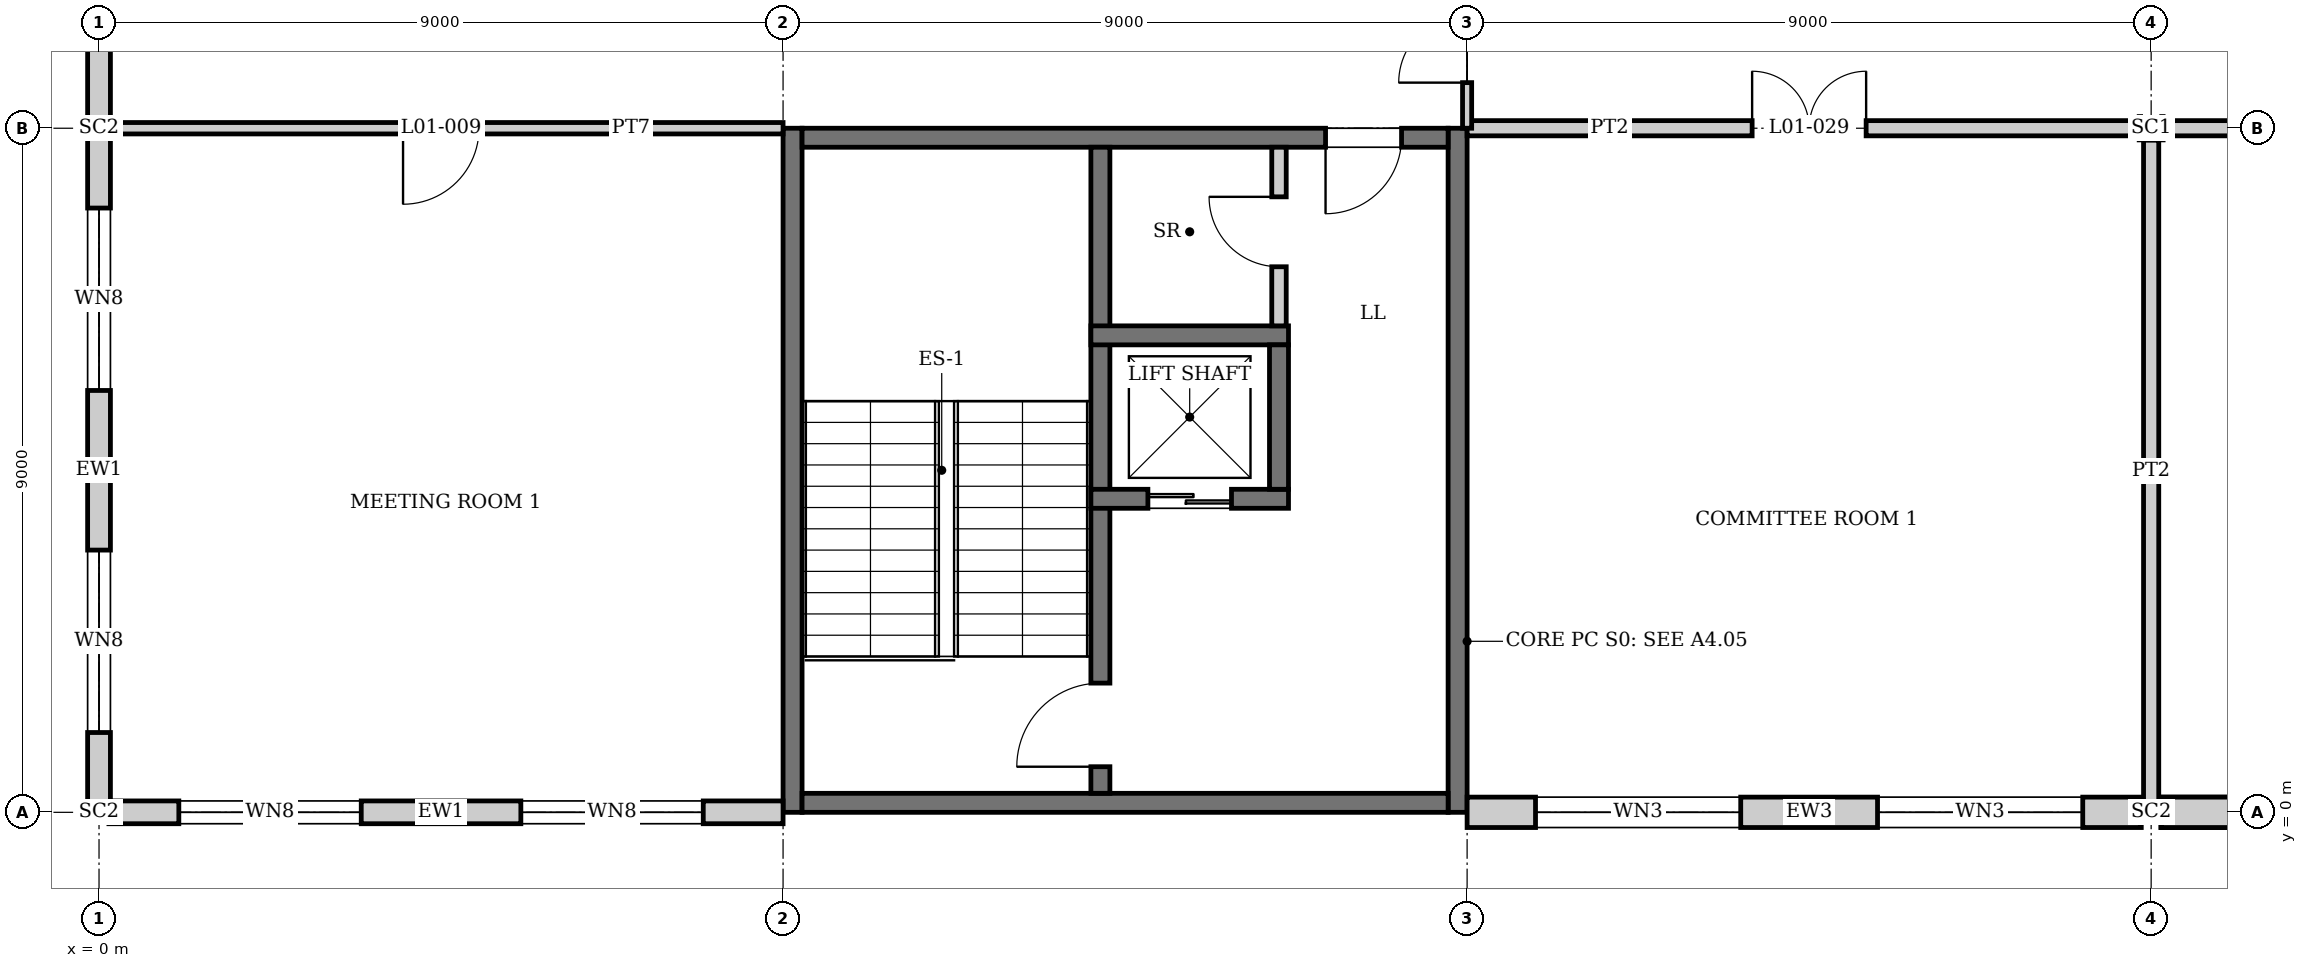
"""IFC4 building model, lengths in metres.
Left out: names, types, materials, properties, quantities, classifications, styles, units other than length and angle.
Written with IfcOpenShell. Run it as: python <this file> out.ifc"""

import sys

from ifc_helpers import new_model, si_unit, direction, frame, frame_2d, origin, origin_2d, place, context, subcontext, project, spatial, polyline, rectangle, i_section, outline, extrude, element, fill, save


model = new_model("IFC4")
c1 = context("Model", 3, precision=1e-05, world=origin(), true_north=direction((0.0, 1.0)))
c2 = subcontext(c1, "Body", "Model", "MODEL_VIEW")
j1 = project(units=[si_unit("LENGTHUNIT", "METRE"), si_unit("PLANEANGLEUNIT", "RADIAN")], contexts=[c1])
p1 = place(None, origin())
s1 = spatial("IfcSite", under=j1, at=p1, CompositionType="ELEMENT")
p2 = place(p1, origin())
s2 = spatial("IfcBuilding", under=s1, at=p2, CompositionType="ELEMENT")
p3 = place(p2, frame((0.0, 0.0, 6.0)))
s3 = spatial("IfcBuildingStorey", under=s2, at=p3, CompositionType="ELEMENT", Elevation=6.0)
for number, where, z_axis, x_axis in (
    (1, (0.0, 0.0, 0.0), (0.0, 0.0, 1.0), (0.0, 1.0, 0.0)),
    (2, (0.0, 9.0, 0.0), (0.0, 0.0, 1.0), (0.0, 1.0, 0.0)),
    (3, (27.0, 0.0, 0.0), (0.0, 0.0, 1.0), (0.0, 1.0, 0.0)),
):
    element("IfcColumn", number, at=place(p3, frame(where, z_axis=z_axis, x_axis=x_axis)), inside=s3, PredefinedType="COLUMN", context=c2, shape_type="SweptSolid", body=[
        extrude(i_section(OverallWidth=0.256, OverallDepth=0.26, WebThickness=0.01, FlangeThickness=0.017, at=origin_2d()), origin(), (0.0, 0.0, 1.0), 4.5),
    ])
p4 = place(p3, frame((27.0, 9.0, 0.0), z_axis=(0.0, 0.0, 1.0), x_axis=(0.0, 1.0, 0.0)))
e4 = element("IfcColumn", 4, at=p4, inside=s3, PredefinedType="COLUMN", context=c2, shape_type="SweptSolid", body=[
    extrude(i_section(OverallWidth=0.307, OverallDepth=0.315, WebThickness=0.012, FlangeThickness=0.019, at=origin_2d()), origin(), (0.0, 0.0, 1.0), 4.5),
])
for number, where, z_axis, x_axis in (
    (5, (9.125, 0.0, 0.0), (0.0, 0.0, 1.0), (0.0, 1.0, 0.0)),
    (6, (17.875, 0.0, 0.0), (0.0, 0.0, 1.0), (0.0, 1.0, 0.0)),
):
    element("IfcWall", number, at=place(p3, frame(where, z_axis=z_axis, x_axis=x_axis)), inside=s3, PredefinedType="SHEAR", context=c2, shape_type="SweptSolid", body=[
        extrude(rectangle(XDim=9.0, YDim=0.25, at=frame_2d((4.5, 0.0))), origin(), (0.0, 0.0, 1.0), 4.5),
    ])
p5 = place(p3, frame((9.25, 0.125, 0.0), z_axis=(0.0, 0.0, 1.0), x_axis=(1.0, 0.0, 0.0)))
e7 = element("IfcWall", 7, at=p5, inside=s3, PredefinedType="SHEAR", context=c2, shape_type="SweptSolid", body=[
    extrude(rectangle(XDim=8.5, YDim=0.25, at=frame_2d((4.25, 0.0))), origin(), (0.0, 0.0, 1.0), 4.5),
])
p6 = place(p3, frame((9.25, 8.875, 0.0), z_axis=(0.0, 0.0, 1.0), x_axis=(1.0, 0.0, 0.0)))
e8 = element("IfcWall", 8, at=p6, inside=s3, PredefinedType="SHEAR", context=c2, shape_type="SweptSolid", body=[
    extrude(rectangle(XDim=8.5, YDim=0.25, at=frame_2d((4.25, 0.0))), origin(), (0.0, 0.0, 1.0), 4.5),
])
p7 = place(p6, frame((6.887, 0.0, 0.0)))
e9 = element("IfcOpeningElement", 9, at=p7, cuts=e8, PredefinedType="OPENING", context=c2, shape_type="SweptSolid", body=[
    extrude(rectangle(XDim=1.0, YDim=2.1, at=frame_2d((0.5, 1.05))), frame((0.0, 0.135, 0.0), z_axis=(0.0, -1.0, 0.0), x_axis=(1.0, 0.0, 0.0)), (0.0, 0.0, 1.0), 0.27),
])
p8 = place(p3, frame((0.13, 0.0, 0.0), z_axis=(0.0, 0.0, 1.0), x_axis=(1.0, 0.0, 0.0)))
e10 = element("IfcWall", 10, at=p8, inside=s3, PredefinedType="SOLIDWALL", context=c2, shape_type="SweptSolid", body=[
    extrude(rectangle(XDim=8.87, YDim=0.3, at=frame_2d((4.435, 0.0))), origin(), (0.0, 0.0, 1.0), 3.991),
])
p9 = place(p8, frame((0.92, 0.0, 0.9)))
e11 = element("IfcOpeningElement", 11, at=p9, cuts=e10, PredefinedType="OPENING", context=c2, shape_type="SweptSolid", body=[
    extrude(rectangle(XDim=2.4, YDim=2.1, at=frame_2d((1.2, 1.05))), frame((0.0, 0.16, 0.0), z_axis=(0.0, -1.0, 0.0), x_axis=(1.0, 0.0, 0.0)), (0.0, 0.0, 1.0), 0.32),
])
p10 = place(p8, frame((5.42, 0.0, 0.9)))
e12 = element("IfcOpeningElement", 12, at=p10, cuts=e10, PredefinedType="OPENING", context=c2, shape_type="SweptSolid", body=[
    extrude(rectangle(XDim=2.4, YDim=2.1, at=frame_2d((1.2, 1.05))), frame((0.0, 0.16, 0.0), z_axis=(0.0, -1.0, 0.0), x_axis=(1.0, 0.0, 0.0)), (0.0, 0.0, 1.0), 0.32),
])
p11 = place(p3, frame((18.0, 0.0, 0.0), z_axis=(0.0, 0.0, 1.0), x_axis=(1.0, 0.0, 0.0)))
e13 = element("IfcWall", 13, at=p11, inside=s3, PredefinedType="SOLIDWALL", context=c2, shape_type="SweptSolid", body=[
    extrude(rectangle(XDim=8.87, YDim=0.4, at=frame_2d((4.435, 0.0))), origin(), (0.0, 0.0, 1.0), 3.991),
])
p12 = place(p11, frame((0.9, 0.0, 1.5)))
e14 = element("IfcOpeningElement", 14, at=p12, cuts=e13, PredefinedType="OPENING", context=c2, shape_type="SweptSolid", body=[
    extrude(rectangle(XDim=2.7, YDim=1.5, at=frame_2d((1.35, 0.75))), frame((0.0, 0.21, 0.0), z_axis=(0.0, -1.0, 0.0), x_axis=(1.0, 0.0, 0.0)), (0.0, 0.0, 1.0), 0.42),
])
p13 = place(p11, frame((5.4, 0.0, 1.5)))
e15 = element("IfcOpeningElement", 15, at=p13, cuts=e13, PredefinedType="OPENING", context=c2, shape_type="SweptSolid", body=[
    extrude(rectangle(XDim=2.7, YDim=1.5, at=frame_2d((1.35, 0.75))), frame((0.0, 0.21, 0.0), z_axis=(0.0, -1.0, 0.0), x_axis=(1.0, 0.0, 0.0)), (0.0, 0.0, 1.0), 0.42),
])
p14 = place(p3, frame((27.13, 0.0, 0.0), z_axis=(0.0, 0.0, 1.0), x_axis=(1.0, 0.0, 0.0)))
e16 = element("IfcWall", 16, at=p14, inside=s3, PredefinedType="SOLIDWALL", context=c2, shape_type="SweptSolid", body=[
    extrude(outline(polyline([(8.74, 0.0), (0.0, 0.0), (0.0, 3.86), (8.692, 0.38), (8.74, 0.5), (8.74, 0.0)])), frame((0.0, 0.2, 0.0), z_axis=(0.0, -1.0, 0.0), x_axis=(1.0, 0.0, 0.0)), (0.0, 0.0, 1.0), 0.4),
])
p15 = place(p3, frame((27.13, 0.0, 0.0), z_axis=(0.0, 0.0, 1.0), x_axis=(1.0, 0.0, 0.0)))
e17 = element("IfcWall", 17, at=p15, inside=s3, PredefinedType="SOLIDWALL", context=c2, shape_type="SweptSolid", body=[
    extrude(outline(polyline([(8.74, 3.991), (8.74, 0.64), (0.371, 3.991), (8.74, 3.991)])), frame((0.0, 0.2, 0.0), z_axis=(0.0, -1.0, 0.0), x_axis=(1.0, 0.0, 0.0)), (0.0, 0.0, 1.0), 0.4),
])
p16 = place(p3, frame((0.0, 0.128, 0.0), z_axis=(0.0, 0.0, 1.0), x_axis=(0.0, 1.0, 0.0)))
e18 = element("IfcWall", 18, at=p16, inside=s3, PredefinedType="SOLIDWALL", context=c2, shape_type="SweptSolid", body=[
    extrude(rectangle(XDim=8.744, YDim=0.3, at=frame_2d((4.372, 0.0))), origin(), (0.0, 0.0, 1.0), 3.947),
])
p17 = place(p16, frame((0.922, 0.0, 0.9)))
e19 = element("IfcOpeningElement", 19, at=p17, cuts=e18, PredefinedType="OPENING", context=c2, shape_type="SweptSolid", body=[
    extrude(rectangle(XDim=2.4, YDim=2.1, at=frame_2d((1.2, 1.05))), frame((0.0, 0.16, 0.0), z_axis=(0.0, -1.0, 0.0), x_axis=(1.0, 0.0, 0.0)), (0.0, 0.0, 1.0), 0.32),
])
p18 = place(p16, frame((5.422, 0.0, 0.9)))
e20 = element("IfcOpeningElement", 20, at=p18, cuts=e18, PredefinedType="OPENING", context=c2, shape_type="SweptSolid", body=[
    extrude(rectangle(XDim=2.4, YDim=2.1, at=frame_2d((1.2, 1.05))), frame((0.0, 0.16, 0.0), z_axis=(0.0, -1.0, 0.0), x_axis=(1.0, 0.0, 0.0)), (0.0, 0.0, 1.0), 0.32),
])
p19 = place(p3, frame((0.0, 9.128, 0.0), z_axis=(0.0, 0.0, 1.0), x_axis=(0.0, 1.0, 0.0)))
e21 = element("IfcWall", 21, at=p19, inside=s3, PredefinedType="SOLIDWALL", context=c2, shape_type="SweptSolid", body=[
    extrude(rectangle(XDim=8.872, YDim=0.3, at=frame_2d((4.436, 0.0))), origin(), (0.0, 0.0, 1.0), 3.947),
])
p20 = place(p19, frame((1.222, 0.0, 0.9)))
e22 = element("IfcOpeningElement", 22, at=p20, cuts=e21, PredefinedType="OPENING", context=c2, shape_type="SweptSolid", body=[
    extrude(rectangle(XDim=1.8, YDim=2.4, at=frame_2d((0.9, 1.2))), frame((0.0, 0.16, 0.0), z_axis=(0.0, -1.0, 0.0), x_axis=(1.0, 0.0, 0.0)), (0.0, 0.0, 1.0), 0.32),
])
p21 = place(p19, frame((5.722, 0.0, 0.9)))
e23 = element("IfcOpeningElement", 23, at=p21, cuts=e21, PredefinedType="OPENING", context=c2, shape_type="SweptSolid", body=[
    extrude(rectangle(XDim=1.8, YDim=2.4, at=frame_2d((0.9, 1.2))), frame((0.0, 0.16, 0.0), z_axis=(0.0, -1.0, 0.0), x_axis=(1.0, 0.0, 0.0)), (0.0, 0.0, 1.0), 0.32),
])
p22 = place(p3, frame((13.175, 0.25, 0.0), z_axis=(0.0, 0.0, 1.0), x_axis=(0.0, 1.0, 0.0)))
e24 = element("IfcWall", 24, at=p22, inside=s3, PredefinedType="SOLIDWALL", context=c2, shape_type="SweptSolid", body=[
    extrude(rectangle(XDim=8.5, YDim=0.25, at=frame_2d((4.25, 0.0))), origin(), (0.0, 0.0, 1.0), 4.25),
])
p23 = place(p22, frame((0.35, 0.0, 0.0)))
e25 = element("IfcOpeningElement", 25, at=p23, cuts=e24, PredefinedType="OPENING", context=c2, shape_type="SweptSolid", body=[
    extrude(rectangle(XDim=1.1, YDim=2.1, at=frame_2d((0.55, 1.05))), frame((0.0, 0.135, 0.0), z_axis=(0.0, -1.0, 0.0), x_axis=(1.0, 0.0, 0.0)), (0.0, 0.0, 1.0), 0.27),
])
p24 = place(p3, frame((13.05, 4.125, 0.0), z_axis=(0.0, 0.0, 1.0), x_axis=(1.0, 0.0, 0.0)))
e26 = element("IfcWall", 26, at=p24, inside=s3, PredefinedType="SOLIDWALL", context=c2, shape_type="SweptSolid", body=[
    extrude(rectangle(XDim=2.6, YDim=0.25, at=frame_2d((1.3, 0.0))), origin(), (0.0, 0.0, 1.0), 4.5),
])
p25 = place(p24, frame((0.75, 0.0, 0.0)))
e27 = element("IfcOpeningElement", 27, at=p25, cuts=e26, PredefinedType="OPENING", context=c2, shape_type="SweptSolid", body=[
    extrude(rectangle(XDim=1.1, YDim=2.1, at=frame_2d((0.55, 1.05))), frame((0.0, 0.135, 0.0), z_axis=(0.0, -1.0, 0.0), x_axis=(1.0, 0.0, 0.0)), (0.0, 0.0, 1.0), 0.27),
])
p26 = place(p3, frame((13.05, 6.275, 0.0), z_axis=(0.0, 0.0, 1.0), x_axis=(1.0, 0.0, 0.0)))
e28 = element("IfcWall", 28, at=p26, inside=s3, PredefinedType="SOLIDWALL", context=c2, shape_type="SweptSolid", body=[
    extrude(rectangle(XDim=2.6, YDim=0.25, at=frame_2d((1.3, 0.0))), origin(), (0.0, 0.0, 1.0), 4.5),
])
p27 = place(p3, frame((15.525, 4.25, 0.0), z_axis=(0.0, 0.0, 1.0), x_axis=(0.0, 1.0, 0.0)))
e29 = element("IfcWall", 29, at=p27, inside=s3, PredefinedType="SOLIDWALL", context=c2, shape_type="SweptSolid", body=[
    extrude(rectangle(XDim=1.9, YDim=0.25, at=frame_2d((0.95, 0.0))), origin(), (0.0, 0.0, 1.0), 4.5),
])
p28 = place(p3, frame((0.13, 9.0, 0.0), z_axis=(0.0, 0.0, 1.0), x_axis=(1.0, 0.0, 0.0)))
e30 = element("IfcWall", 30, at=p28, inside=s3, PredefinedType="PARTITIONING", context=c2, shape_type="SweptSolid", body=[
    extrude(rectangle(XDim=8.87, YDim=0.15, at=frame_2d((4.435, 0.0))), origin(), (0.0, 0.0, 1.0), 3.822),
])
p29 = place(p28, frame((3.87, 0.0, 0.0)))
e31 = element("IfcOpeningElement", 31, at=p29, cuts=e30, PredefinedType="OPENING", context=c2, shape_type="SweptSolid", body=[
    extrude(rectangle(XDim=1.0, YDim=2.1, at=frame_2d((0.5, 1.05))), frame((0.0, 0.085, 0.0), z_axis=(0.0, -1.0, 0.0), x_axis=(1.0, 0.0, 0.0)), (0.0, 0.0, 1.0), 0.17),
])
p30 = place(p3, frame((18.0, 9.0, 0.0), z_axis=(0.0, 0.0, 1.0), x_axis=(1.0, 0.0, 0.0)))
e32 = element("IfcWall", 32, at=p30, inside=s3, PredefinedType="PARTITIONING", context=c2, shape_type="SweptSolid", body=[
    extrude(rectangle(XDim=8.843, YDim=0.2, at=frame_2d((4.421, 0.0))), origin(), (0.0, 0.0, 1.0), 3.991),
])
p31 = place(p30, frame((3.75, 0.0, 0.0)))
e33 = element("IfcOpeningElement", 33, at=p31, cuts=e32, PredefinedType="OPENING", context=c2, shape_type="SweptSolid", body=[
    extrude(rectangle(XDim=1.5, YDim=2.1, at=frame_2d((0.75, 1.05))), frame((0.0, 0.11, 0.0), z_axis=(0.0, -1.0, 0.0), x_axis=(1.0, 0.0, 0.0)), (0.0, 0.0, 1.0), 0.22),
])
p32 = place(p3, frame((27.157, 9.0, 0.0), z_axis=(0.0, 0.0, 1.0), x_axis=(1.0, 0.0, 0.0)))
e34 = element("IfcWall", 34, at=p32, inside=s3, PredefinedType="PARTITIONING", context=c2, shape_type="SweptSolid", body=[
    extrude(rectangle(XDim=8.685, YDim=0.2, at=frame_2d((4.343, 0.0))), origin(), (0.0, 0.0, 1.0), 3.991),
])
p33 = place(p32, frame((3.593, 0.0, 0.0)))
e35 = element("IfcOpeningElement", 35, at=p33, cuts=e34, PredefinedType="OPENING", context=c2, shape_type="SweptSolid", body=[
    extrude(rectangle(XDim=1.5, YDim=2.1, at=frame_2d((0.75, 1.05))), frame((0.0, 0.11, 0.0), z_axis=(0.0, -1.0, 0.0), x_axis=(1.0, 0.0, 0.0)), (0.0, 0.0, 1.0), 0.22),
])
p34 = place(p3, frame((15.525, 6.4, 0.0), z_axis=(0.0, 0.0, 1.0), x_axis=(0.0, 1.0, 0.0)))
e36 = element("IfcWall", 36, at=p34, inside=s3, PredefinedType="PARTITIONING", context=c2, shape_type="SweptSolid", body=[
    extrude(rectangle(XDim=2.35, YDim=0.19, at=frame_2d((1.175, 0.0))), origin(), (0.0, 0.0, 1.0), 4.25),
])
p35 = place(p34, frame((0.778, 0.0, 0.0)))
e37 = element("IfcOpeningElement", 37, at=p35, cuts=e36, PredefinedType="OPENING", context=c2, shape_type="SweptSolid", body=[
    extrude(rectangle(XDim=0.92, YDim=2.1, at=frame_2d((0.46, 1.05))), frame((0.0, 0.105, 0.0), z_axis=(0.0, -1.0, 0.0), x_axis=(1.0, 0.0, 0.0)), (0.0, 0.0, 1.0), 0.21),
])
p36 = place(p3, frame((18.0, 9.0, 0.0), z_axis=(0.0, 0.0, 1.0), x_axis=(0.0, 1.0, 0.0)))
e38 = element("IfcWall", 38, at=p36, inside=s3, PredefinedType="PARTITIONING", context=c2, shape_type="SweptSolid", body=[
    extrude(rectangle(XDim=8.843, YDim=0.12, at=frame_2d((4.421, 0.0))), origin(), (0.0, 0.0, 1.0), 3.991),
])
p37 = place(p36, frame((0.6, 0.0, 0.0)))
e39 = element("IfcOpeningElement", 39, at=p37, cuts=e38, PredefinedType="OPENING", context=c2, shape_type="SweptSolid", body=[
    extrude(rectangle(XDim=1.8, YDim=2.1, at=frame_2d((0.9, 1.05))), frame((0.0, 0.07, 0.0), z_axis=(0.0, -1.0, 0.0), x_axis=(1.0, 0.0, 0.0)), (0.0, 0.0, 1.0), 0.14),
])
p38 = place(p3, frame((27.0, 0.13, 0.0), z_axis=(0.0, 0.0, 1.0), x_axis=(0.0, 1.0, 0.0)))
e40 = element("IfcWall", 40, at=p38, inside=s3, PredefinedType="PARTITIONING", context=c2, shape_type="SweptSolid", body=[
    extrude(rectangle(XDim=8.713, YDim=0.2, at=frame_2d((4.356, 0.0))), origin(), (0.0, 0.0, 1.0), 3.947),
])
p39 = place(p9, origin())
e41 = element("IfcWindow", 41, at=p39, inside=s3, PartitioningType="SINGLE_PANEL", PredefinedType="WINDOW", context=c2, shape_type="SweptSolid", body=[
    extrude(rectangle(XDim=2.4, YDim=2.1, at=frame_2d((1.2, 1.05))), frame((0.0, 0.03, 0.0), z_axis=(0.0, -1.0, 0.0), x_axis=(1.0, 0.0, 0.0)), (0.0, 0.0, 1.0), 0.06),
])
fill(e11, e41)
p40 = place(p10, origin())
e42 = element("IfcWindow", 42, at=p40, inside=s3, PartitioningType="SINGLE_PANEL", PredefinedType="WINDOW", context=c2, shape_type="SweptSolid", body=[
    extrude(rectangle(XDim=2.4, YDim=2.1, at=frame_2d((1.2, 1.05))), frame((0.0, 0.03, 0.0), z_axis=(0.0, -1.0, 0.0), x_axis=(1.0, 0.0, 0.0)), (0.0, 0.0, 1.0), 0.06),
])
fill(e12, e42)
p41 = place(p12, origin())
e43 = element("IfcWindow", 43, at=p41, inside=s3, PartitioningType="SINGLE_PANEL", PredefinedType="WINDOW", context=c2, shape_type="SweptSolid", body=[
    extrude(rectangle(XDim=2.7, YDim=1.5, at=frame_2d((1.35, 0.75))), frame((0.0, 0.03, 0.0), z_axis=(0.0, -1.0, 0.0), x_axis=(1.0, 0.0, 0.0)), (0.0, 0.0, 1.0), 0.06),
])
fill(e14, e43)
p42 = place(p13, origin())
e44 = element("IfcWindow", 44, at=p42, inside=s3, PartitioningType="SINGLE_PANEL", PredefinedType="WINDOW", context=c2, shape_type="SweptSolid", body=[
    extrude(rectangle(XDim=2.7, YDim=1.5, at=frame_2d((1.35, 0.75))), frame((0.0, 0.03, 0.0), z_axis=(0.0, -1.0, 0.0), x_axis=(1.0, 0.0, 0.0)), (0.0, 0.0, 1.0), 0.06),
])
fill(e15, e44)
p43 = place(p17, origin())
e45 = element("IfcWindow", 45, at=p43, inside=s3, PartitioningType="SINGLE_PANEL", PredefinedType="WINDOW", context=c2, shape_type="SweptSolid", body=[
    extrude(rectangle(XDim=2.4, YDim=2.1, at=frame_2d((1.2, 1.05))), frame((0.0, 0.03, 0.0), z_axis=(0.0, -1.0, 0.0), x_axis=(1.0, 0.0, 0.0)), (0.0, 0.0, 1.0), 0.06),
])
fill(e19, e45)
p44 = place(p18, origin())
e46 = element("IfcWindow", 46, at=p44, inside=s3, PartitioningType="SINGLE_PANEL", PredefinedType="WINDOW", context=c2, shape_type="SweptSolid", body=[
    extrude(rectangle(XDim=2.4, YDim=2.1, at=frame_2d((1.2, 1.05))), frame((0.0, 0.03, 0.0), z_axis=(0.0, -1.0, 0.0), x_axis=(1.0, 0.0, 0.0)), (0.0, 0.0, 1.0), 0.06),
])
fill(e20, e46)
p45 = place(p25, origin())
e47 = element("IfcDoor", 47, at=p45, inside=s3, OperationType="DOUBLE_DOOR_SLIDING", PredefinedType="DOOR", context=c2, shape_type="SweptSolid", body=[
    extrude(rectangle(XDim=1.1, YDim=2.1, at=frame_2d((0.55, 1.05))), frame((0.0, 0.025, 0.0), z_axis=(0.0, -1.0, 0.0), x_axis=(1.0, 0.0, 0.0)), (0.0, 0.0, 1.0), 0.05),
])
fill(e27, e47)
p46 = place(p37, origin())
e48 = element("IfcDoor", 48, at=p46, inside=s3, OperationType="DOUBLE_DOOR_SINGLE_SWING", PredefinedType="DOOR", context=c2, shape_type="SweptSolid", body=[
    extrude(rectangle(XDim=1.8, YDim=2.1, at=frame_2d((0.9, 1.05))), frame((0.0, 0.025, 0.0), z_axis=(0.0, -1.0, 0.0), x_axis=(1.0, 0.0, 0.0)), (0.0, 0.0, 1.0), 0.05),
])
fill(e39, e48)
p47 = place(p29, frame((1.0, 0.0, 0.0), z_axis=(0.0, 0.0, 1.0), x_axis=(-1.0, 0.0, 0.0)))
e49 = element("IfcDoor", 49, at=p47, inside=s3, OperationType="SINGLE_SWING_RIGHT", PredefinedType="DOOR", context=c2, shape_type="SweptSolid", body=[
    extrude(rectangle(XDim=1.0, YDim=2.1, at=frame_2d((0.5, 1.05))), frame((0.0, 0.025, 0.0), z_axis=(0.0, -1.0, 0.0), x_axis=(1.0, 0.0, 0.0)), (0.0, 0.0, 1.0), 0.05),
])
fill(e31, e49)
p48 = place(p23, origin())
e50 = element("IfcDoor", 50, at=p48, inside=s3, OperationType="SINGLE_SWING_LEFT", PredefinedType="DOOR", context=c2, shape_type="SweptSolid", body=[
    extrude(rectangle(XDim=1.1, YDim=2.1, at=frame_2d((0.55, 1.05))), frame((0.0, 0.025, 0.0), z_axis=(0.0, -1.0, 0.0), x_axis=(1.0, 0.0, 0.0)), (0.0, 0.0, 1.0), 0.05),
])
fill(e25, e50)
p49 = place(p7, frame((1.0, 0.0, 0.0), z_axis=(0.0, 0.0, 1.0), x_axis=(-1.0, 0.0, 0.0)))
e51 = element("IfcDoor", 51, at=p49, inside=s3, OperationType="SINGLE_SWING_RIGHT", PredefinedType="DOOR", context=c2, shape_type="SweptSolid", body=[
    extrude(rectangle(XDim=1.0, YDim=2.1, at=frame_2d((0.5, 1.05))), frame((0.0, 0.025, 0.0), z_axis=(0.0, -1.0, 0.0), x_axis=(1.0, 0.0, 0.0)), (0.0, 0.0, 1.0), 0.05),
])
fill(e9, e51)
p50 = place(p35, origin())
e52 = element("IfcDoor", 52, at=p50, inside=s3, OperationType="SINGLE_SWING_RIGHT", PredefinedType="DOOR", context=c2, shape_type="SweptSolid", body=[
    extrude(rectangle(XDim=0.92, YDim=2.1, at=frame_2d((0.46, 1.05))), frame((0.0, 0.025, 0.0), z_axis=(0.0, -1.0, 0.0), x_axis=(1.0, 0.0, 0.0)), (0.0, 0.0, 1.0), 0.05),
])
fill(e37, e52)
p51 = place(p31, origin())
e53 = element("IfcDoor", 53, at=p51, inside=s3, OperationType="DOUBLE_DOOR_SINGLE_SWING", PredefinedType="DOOR", context=c2, shape_type="SweptSolid", body=[
    extrude(rectangle(XDim=1.5, YDim=2.1, at=frame_2d((0.75, 1.05))), frame((0.0, 0.025, 0.0), z_axis=(0.0, -1.0, 0.0), x_axis=(1.0, 0.0, 0.0)), (0.0, 0.0, 1.0), 0.05),
])
fill(e33, e53)
save(model, sys.argv[1])
